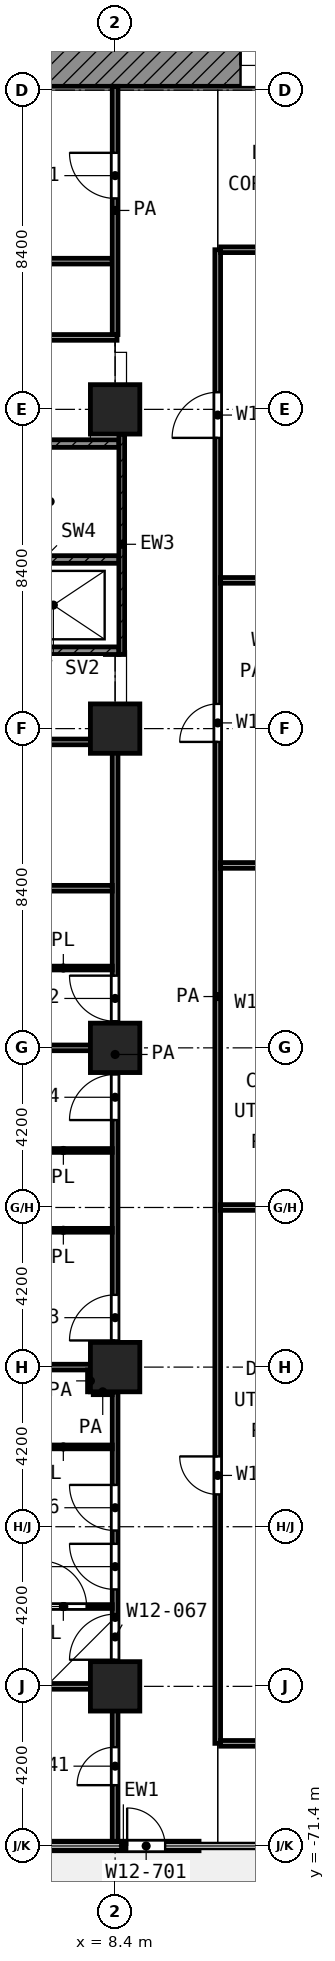
"""IFC4 building model, lengths in metres.
Left out: names, types, materials, properties, quantities, classifications, styles, units other than length and angle.
Written with IfcOpenShell. Run it as: python <this file> out.ifc"""

import sys

from ifc_helpers import new_model, si_unit, direction, frame, frame_2d, origin, origin_2d, place, context, subcontext, project, spatial, rectangle, extrude, element, fill, save


model = new_model("IFC4")
c1 = context("Model", 3, precision=1e-05, world=origin(), true_north=direction((0.0, 1.0)))
c2 = subcontext(c1, "Body", "Model", "MODEL_VIEW")
j1 = project(units=[si_unit("LENGTHUNIT", "METRE"), si_unit("PLANEANGLEUNIT", "RADIAN")], contexts=[c1])
p1 = place(None, origin())
s1 = spatial("IfcSite", under=j1, at=p1, CompositionType="ELEMENT")
p2 = place(p1, origin())
s2 = spatial("IfcBuilding", under=s1, at=p2, CompositionType="ELEMENT")
p3 = place(p2, frame((0.0, 0.0, 56.0)))
s3 = spatial("IfcBuildingStorey", under=s2, at=p3, CompositionType="ELEMENT", Elevation=56.0)
for number, where, z_axis, x_axis in (
    (1, (8.4, -33.6, 0.0), (0.0, 0.0, 1.0), (1.0, 0.0, 0.0)),
    (2, (8.4, -42.0, 0.0), (0.0, 0.0, 1.0), (1.0, 0.0, 0.0)),
    (3, (8.4, -50.4, 0.0), (0.0, 0.0, 1.0), (1.0, 0.0, 0.0)),
    (4, (8.4, -58.8, 0.0), (0.0, 0.0, 1.0), (1.0, 0.0, 0.0)),
    (5, (8.4, -67.2, 0.0), (0.0, 0.0, 1.0), (1.0, 0.0, 0.0)),
):
    element("IfcColumn", number, at=place(p3, frame(where, z_axis=z_axis, x_axis=x_axis)), inside=s3, PredefinedType="COLUMN", context=c2, shape_type="SweptSolid", body=[
        extrude(rectangle(XDim=1.3, YDim=1.3, at=origin_2d()), origin(), (0.0, 0.0, 1.0), 4.2),
    ])
p4 = place(p3, frame((6.625, -71.4, 0.0), z_axis=(0.0, 0.0, 1.0), x_axis=(1.0, 0.0, 0.0)))
e6 = element("IfcWall", 6, at=p4, inside=s3, PredefinedType="SOLIDWALL", context=c2, shape_type="SweptSolid", body=[
    extrude(rectangle(XDim=3.983, YDim=0.25, at=frame_2d((1.992, 0.0))), origin(), (0.0, 0.0, 1.0), 3.78),
])
p5 = place(p4, frame((2.092, 0.0, 0.0)))
e7 = element("IfcOpeningElement", 7, at=p5, cuts=e6, PredefinedType="OPENING", context=c2, shape_type="SweptSolid", body=[
    extrude(rectangle(XDim=1.0, YDim=2.1, at=frame_2d((0.5, 1.05))), frame((0.0, 0.135, 0.0), z_axis=(0.0, -1.0, 0.0), x_axis=(1.0, 0.0, 0.0)), (0.0, 0.0, 1.0), 0.27),
])
p6 = place(p3, frame((5.4, -24.55, 0.0), z_axis=(0.0, 0.0, 1.0), x_axis=(1.0, 0.0, 0.0)))
e8 = element("IfcWall", 8, at=p6, inside=s3, PredefinedType="SHEAR", context=c2, shape_type="SweptSolid", body=[
    extrude(rectangle(XDim=18.6, YDim=1.1, at=frame_2d((9.3, 0.0))), origin(), (0.0, 0.0, 1.0), 3.9),
])
p7 = place(p6, frame((6.3, 0.0, 0.0)))
e9 = element("IfcOpeningElement", 9, at=p7, cuts=e8, PredefinedType="OPENING", context=c2, shape_type="SweptSolid", body=[
    extrude(rectangle(XDim=1.8, YDim=2.1, at=frame_2d((0.9, 1.05))), frame((0.0, 0.56, 0.0), z_axis=(0.0, -1.0, 0.0), x_axis=(1.0, 0.0, 0.0)), (0.0, 0.0, 1.0), 1.12),
])
p8 = place(p3, frame((8.575, -40.05, 0.0), z_axis=(0.0, 0.0, 1.0), x_axis=(0.0, 1.0, 0.0)))
e10 = element("IfcWall", 10, at=p8, inside=s3, PredefinedType="SHEAR", context=c2, shape_type="SweptSolid", body=[
    extrude(rectangle(XDim=5.8, YDim=0.15, at=frame_2d((2.9, 0.0))), origin(), (0.0, 0.0, 1.0), 3.9),
])
p9 = place(p3, frame((0.45, -34.5, 0.0), z_axis=(0.0, 0.0, 1.0), x_axis=(1.0, 0.0, 0.0)))
e11 = element("IfcWall", 11, at=p9, inside=s3, PredefinedType="SHEAR", context=c2, shape_type="SweptSolid", body=[
    extrude(rectangle(XDim=8.05, YDim=0.2, at=frame_2d((4.025, 0.0))), origin(), (0.0, 0.0, 1.0), 3.9),
])
p10 = place(p9, frame((0.75, 0.0, 0.0)))
e12 = element("IfcOpeningElement", 12, at=p10, cuts=e11, PredefinedType="OPENING", context=c2, shape_type="SweptSolid", body=[
    extrude(rectangle(XDim=1.1, YDim=2.1, at=frame_2d((0.55, 1.05))), frame((0.0, 0.11, 0.0), z_axis=(0.0, -1.0, 0.0), x_axis=(1.0, 0.0, 0.0)), (0.0, 0.0, 1.0), 0.22),
])
p11 = place(p3, frame((0.45, -37.55, 0.0), z_axis=(0.0, 0.0, 1.0), x_axis=(1.0, 0.0, 0.0)))
e13 = element("IfcWall", 13, at=p11, inside=s3, PredefinedType="SHEAR", context=c2, shape_type="SweptSolid", body=[
    extrude(rectangle(XDim=8.05, YDim=0.2, at=frame_2d((4.025, 0.0))), origin(), (0.0, 0.0, 1.0), 3.9),
])
p12 = place(p11, frame((0.1, 0.0, 0.0)))
e14 = element("IfcOpeningElement", 14, at=p12, cuts=e13, PredefinedType="OPENING", context=c2, shape_type="SweptSolid", body=[
    extrude(rectangle(XDim=1.1, YDim=2.1, at=frame_2d((0.55, 1.05))), frame((0.0, 0.11, 0.0), z_axis=(0.0, -1.0, 0.0), x_axis=(1.0, 0.0, 0.0)), (0.0, 0.0, 1.0), 0.22),
])
p13 = place(p3, frame((0.45, -39.95, 0.0), z_axis=(0.0, 0.0, 1.0), x_axis=(1.0, 0.0, 0.0)))
e15 = element("IfcWall", 15, at=p13, inside=s3, PredefinedType="SHEAR", context=c2, shape_type="SweptSolid", body=[
    extrude(rectangle(XDim=8.05, YDim=0.2, at=frame_2d((4.025, 0.0))), origin(), (0.0, 0.0, 1.0), 3.9),
])
p14 = place(p13, frame((2.0, 0.0, 0.0)))
e16 = element("IfcOpeningElement", 16, at=p14, cuts=e15, PredefinedType="OPENING", context=c2, shape_type="SweptSolid", body=[
    extrude(rectangle(XDim=1.1, YDim=2.1, at=frame_2d((0.55, 1.05))), frame((0.0, 0.11, 0.0), z_axis=(0.0, -1.0, 0.0), x_axis=(1.0, 0.0, 0.0)), (0.0, 0.0, 1.0), 0.22),
])
p15 = place(p3, frame((5.75, -65.1, 0.0), z_axis=(0.0, 0.0, 1.0), x_axis=(1.0, 0.0, 0.0)))
e17 = element("IfcWall", 17, at=p15, inside=s3, PredefinedType="PARTITIONING", context=c2, shape_type="SweptSolid", body=[
    extrude(rectangle(XDim=2.575, YDim=0.1, at=frame_2d((1.288, 0.0))), origin(), (0.0, 0.0, 1.0), 3.9),
])
p16 = place(p15, frame((0.7, 0.0, 0.0)))
e18 = element("IfcOpeningElement", 18, at=p16, cuts=e17, PredefinedType="OPENING", context=c2, shape_type="SweptSolid", body=[
    extrude(rectangle(XDim=1.2, YDim=2.1, at=frame_2d((0.6, 1.05))), frame((0.0, 0.06, 0.0), z_axis=(0.0, -1.0, 0.0), x_axis=(1.0, 0.0, 0.0)), (0.0, 0.0, 1.0), 0.12),
])
p17 = place(p3, frame((5.75, -60.9, 0.0), z_axis=(0.0, 0.0, 1.0), x_axis=(1.0, 0.0, 0.0)))
e19 = element("IfcWall", 19, at=p17, inside=s3, PredefinedType="PARTITIONING", context=c2, shape_type="SweptSolid", body=[
    extrude(rectangle(XDim=2.575, YDim=0.1, at=frame_2d((1.288, 0.0))), origin(), (0.0, 0.0, 1.0), 3.9),
])
p18 = place(p3, frame((5.751, -55.2, 0.0), z_axis=(0.0, 0.0, 1.0), x_axis=(1.0, 0.0, 0.0)))
e20 = element("IfcWall", 20, at=p18, inside=s3, PredefinedType="PARTITIONING", context=c2, shape_type="SweptSolid", body=[
    extrude(rectangle(XDim=2.574, YDim=0.1, at=frame_2d((1.287, 0.0))), origin(), (0.0, 0.0, 1.0), 3.9),
])
p19 = place(p3, frame((5.752, -53.1, 0.0), z_axis=(0.0, 0.0, 1.0), x_axis=(1.0, 0.0, 0.0)))
e21 = element("IfcWall", 21, at=p19, inside=s3, PredefinedType="PARTITIONING", context=c2, shape_type="SweptSolid", body=[
    extrude(rectangle(XDim=2.573, YDim=0.1, at=frame_2d((1.287, 0.0))), origin(), (0.0, 0.0, 1.0), 3.9),
])
p20 = place(p3, frame((5.75, -48.3, 0.0), z_axis=(0.0, 0.0, 1.0), x_axis=(1.0, 0.0, 0.0)))
e22 = element("IfcWall", 22, at=p20, inside=s3, PredefinedType="PARTITIONING", context=c2, shape_type="SweptSolid", body=[
    extrude(rectangle(XDim=2.575, YDim=0.1, at=frame_2d((1.288, 0.0))), origin(), (0.0, 0.0, 1.0), 3.9),
])
p21 = place(p3, frame((11.175, -68.7, 0.0), z_axis=(0.0, 0.0, 1.0), x_axis=(1.0, 0.0, 0.0)))
e23 = element("IfcWall", 23, at=p21, inside=s3, PredefinedType="PARTITIONING", context=c2, shape_type="SweptSolid", body=[
    extrude(rectangle(XDim=2.85, YDim=0.15, at=frame_2d((1.425, 0.0))), origin(), (0.0, 0.0, 1.0), 3.9),
])
p22 = place(p3, frame((1.913, -67.2, 0.0), z_axis=(0.0, 0.0, 1.0), x_axis=(1.0, 0.0, 0.0)))
e24 = element("IfcWall", 24, at=p22, inside=s3, PredefinedType="PARTITIONING", context=c2, shape_type="SweptSolid", body=[
    extrude(rectangle(XDim=6.412, YDim=0.15, at=frame_2d((3.206, 0.0))), origin(), (0.0, 0.0, 1.0), 3.9),
])
p23 = place(p3, frame((7.825, -59.45, 0.0), z_axis=(0.0, 0.0, 1.0), x_axis=(1.0, 0.0, 0.0)))
e25 = element("IfcWall", 25, at=p23, inside=s3, PredefinedType="PARTITIONING", context=c2, shape_type="SweptSolid", body=[
    extrude(rectangle(XDim=0.498, YDim=0.15, at=frame_2d((0.249, 0.0))), origin(), (0.0, 0.0, 1.0), 3.9),
])
p24 = place(p3, frame((0.08, -58.8, 0.0), z_axis=(0.0, 0.0, 1.0), x_axis=(1.0, 0.0, 0.0)))
e26 = element("IfcWall", 26, at=p24, inside=s3, PredefinedType="PARTITIONING", context=c2, shape_type="SweptSolid", body=[
    extrude(rectangle(XDim=8.243, YDim=0.15, at=frame_2d((4.122, 0.0))), origin(), (0.0, 0.0, 1.0), 3.9),
])
p25 = place(p3, frame((11.175, -54.6, 0.0), z_axis=(0.0, 0.0, 1.0), x_axis=(1.0, 0.0, 0.0)))
e27 = element("IfcWall", 27, at=p25, inside=s3, PredefinedType="PARTITIONING", context=c2, shape_type="SweptSolid", body=[
    extrude(rectangle(XDim=2.85, YDim=0.15, at=frame_2d((1.425, 0.0))), origin(), (0.0, 0.0, 1.0), 3.9),
])
for number, where, z_axis, x_axis in (
    (28, (0.08, -50.4, 0.0), (0.0, 0.0, 1.0), (1.0, 0.0, 0.0)),
    (29, (0.08, -46.2, 0.0), (0.0, 0.0, 1.0), (1.0, 0.0, 0.0)),
):
    element("IfcWall", number, at=place(p3, frame(where, z_axis=z_axis, x_axis=x_axis)), inside=s3, PredefinedType="PARTITIONING", context=c2, shape_type="SweptSolid", body=[
        extrude(rectangle(XDim=8.245, YDim=0.15, at=frame_2d((4.123, 0.0))), origin(), (0.0, 0.0, 1.0), 3.9),
    ])
p26 = place(p3, frame((11.175, -45.6, 0.0), z_axis=(0.0, 0.0, 1.0), x_axis=(1.0, 0.0, 0.0)))
e30 = element("IfcWall", 30, at=p26, inside=s3, PredefinedType="PARTITIONING", context=c2, shape_type="SweptSolid", body=[
    extrude(rectangle(XDim=2.85, YDim=0.15, at=frame_2d((1.425, 0.0))), origin(), (0.0, 0.0, 1.0), 3.9),
])
p27 = place(p3, frame((2.327, -42.35, 0.0), z_axis=(0.0, 0.0, 1.0), x_axis=(1.0, 0.0, 0.0)))
e31 = element("IfcWall", 31, at=p27, inside=s3, PredefinedType="PARTITIONING", context=c2, shape_type="SweptSolid", body=[
    extrude(rectangle(XDim=5.998, YDim=0.15, at=frame_2d((2.999, 0.0))), origin(), (0.0, 0.0, 1.0), 3.9),
])
p28 = place(p27, frame((2.499, 0.0, 0.0)))
e32 = element("IfcOpeningElement", 32, at=p28, cuts=e31, PredefinedType="OPENING", context=c2, shape_type="SweptSolid", body=[
    extrude(rectangle(XDim=1.0, YDim=2.1, at=frame_2d((0.5, 1.05))), frame((0.0, 0.085, 0.0), z_axis=(0.0, -1.0, 0.0), x_axis=(1.0, 0.0, 0.0)), (0.0, 0.0, 1.0), 0.17),
])
p29 = place(p3, frame((11.175, -38.1, 0.0), z_axis=(0.0, 0.0, 1.0), x_axis=(1.0, 0.0, 0.0)))
e33 = element("IfcWall", 33, at=p29, inside=s3, PredefinedType="PARTITIONING", context=c2, shape_type="SweptSolid", body=[
    extrude(rectangle(XDim=2.85, YDim=0.15, at=frame_2d((1.425, 0.0))), origin(), (0.0, 0.0, 1.0), 3.9),
])
p30 = place(p3, frame((1.002, -31.707, 0.0), z_axis=(0.0, 0.0, 1.0), x_axis=(1.0, 0.0, 0.0)))
e34 = element("IfcWall", 34, at=p30, inside=s3, PredefinedType="PARTITIONING", context=c2, shape_type="SweptSolid", body=[
    extrude(rectangle(XDim=7.448, YDim=0.15, at=frame_2d((3.724, 0.0))), origin(), (0.0, 0.0, 1.0), 3.9),
])
p31 = place(p30, frame((3.199, 0.0, 0.0)))
e35 = element("IfcOpeningElement", 35, at=p31, cuts=e34, PredefinedType="OPENING", context=c2, shape_type="SweptSolid", body=[
    extrude(rectangle(XDim=1.0, YDim=2.1, at=frame_2d((0.5, 1.05))), frame((0.0, 0.085, 0.0), z_axis=(0.0, -1.0, 0.0), x_axis=(1.0, 0.0, 0.0)), (0.0, 0.0, 1.0), 0.17),
])
p32 = place(p3, frame((0.08, -29.7, 0.0), z_axis=(0.0, 0.0, 1.0), x_axis=(1.0, 0.0, 0.0)))
e36 = element("IfcWall", 36, at=p32, inside=s3, PredefinedType="PARTITIONING", context=c2, shape_type="SweptSolid", body=[
    extrude(rectangle(XDim=8.245, YDim=0.15, at=frame_2d((4.123, 0.0))), origin(), (0.0, 0.0, 1.0), 3.9),
])
p33 = place(p3, frame((11.175, -29.4, 0.0), z_axis=(0.0, 0.0, 1.0), x_axis=(1.0, 0.0, 0.0)))
e37 = element("IfcWall", 37, at=p33, inside=s3, PredefinedType="PARTITIONING", context=c2, shape_type="SweptSolid", body=[
    extrude(rectangle(XDim=2.85, YDim=0.15, at=frame_2d((1.425, 0.0))), origin(), (0.0, 0.0, 1.0), 3.9),
])
p34 = place(p3, frame((7.75, -59.45, 0.0), z_axis=(0.0, 0.0, 1.0), x_axis=(0.0, 1.0, 0.0)))
e38 = element("IfcWall", 38, at=p34, inside=s3, PredefinedType="PARTITIONING", context=c2, shape_type="SweptSolid", body=[
    extrude(rectangle(XDim=0.575, YDim=0.15, at=frame_2d((0.288, 0.0))), origin(), (0.0, 0.0, 1.0), 3.9),
])
p35 = place(p3, frame((8.4, -71.32, 0.0), z_axis=(0.0, 0.0, 1.0), x_axis=(0.0, 1.0, 0.0)))
e39 = element("IfcWall", 39, at=p35, inside=s3, PredefinedType="PARTITIONING", context=c2, shape_type="SweptSolid", body=[
    extrude(rectangle(XDim=11.868, YDim=0.15, at=frame_2d((5.934, 0.0))), origin(), (0.0, 0.0, 1.0), 3.9),
])
p36 = place(p35, frame((6.67, 0.0, 0.0)))
e40 = element("IfcOpeningElement", 40, at=p36, cuts=e39, PredefinedType="OPENING", context=c2, shape_type="SweptSolid", body=[
    extrude(rectangle(XDim=1.2, YDim=2.1, at=frame_2d((0.6, 1.05))), frame((0.0, 0.085, 0.0), z_axis=(0.0, -1.0, 0.0), x_axis=(1.0, 0.0, 0.0)), (0.0, 0.0, 1.0), 0.17),
])
p37 = place(p35, frame((8.22, 0.0, 0.0)))
e41 = element("IfcOpeningElement", 41, at=p37, cuts=e39, PredefinedType="OPENING", context=c2, shape_type="SweptSolid", body=[
    extrude(rectangle(XDim=1.2, YDim=2.1, at=frame_2d((0.6, 1.05))), frame((0.0, 0.085, 0.0), z_axis=(0.0, -1.0, 0.0), x_axis=(1.0, 0.0, 0.0)), (0.0, 0.0, 1.0), 0.17),
])
p38 = place(p35, frame((4.82, 0.0, 0.0)))
e42 = element("IfcOpeningElement", 42, at=p38, cuts=e39, PredefinedType="OPENING", context=c2, shape_type="SweptSolid", body=[
    extrude(rectangle(XDim=1.2, YDim=2.1, at=frame_2d((0.6, 1.05))), frame((0.0, 0.085, 0.0), z_axis=(0.0, -1.0, 0.0), x_axis=(1.0, 0.0, 0.0)), (0.0, 0.0, 1.0), 0.17),
])
p39 = place(p35, frame((1.52, 0.0, 0.0)))
e43 = element("IfcOpeningElement", 43, at=p39, cuts=e39, PredefinedType="OPENING", context=c2, shape_type="SweptSolid", body=[
    extrude(rectangle(XDim=1.0, YDim=2.1, at=frame_2d((0.5, 1.05))), frame((0.0, 0.085, 0.0), z_axis=(0.0, -1.0, 0.0), x_axis=(1.0, 0.0, 0.0)), (0.0, 0.0, 1.0), 0.17),
])
p40 = place(p3, frame((8.4, -58.798, 0.0), z_axis=(0.0, 0.0, 1.0), x_axis=(0.0, 1.0, 0.0)))
e44 = element("IfcWall", 44, at=p40, inside=s3, PredefinedType="PARTITIONING", context=c2, shape_type="SweptSolid", body=[
    extrude(rectangle(XDim=16.448, YDim=0.15, at=frame_2d((8.224, 0.0))), origin(), (0.0, 0.0, 1.0), 3.9),
])
p41 = place(p40, frame((9.098, 0.0, 0.0)))
e45 = element("IfcOpeningElement", 45, at=p41, cuts=e44, PredefinedType="OPENING", context=c2, shape_type="SweptSolid", body=[
    extrude(rectangle(XDim=1.2, YDim=2.1, at=frame_2d((0.6, 1.05))), frame((0.0, 0.085, 0.0), z_axis=(0.0, -1.0, 0.0), x_axis=(1.0, 0.0, 0.0)), (0.0, 0.0, 1.0), 0.17),
])
p42 = place(p40, frame((0.699, 0.0, 0.0)))
e46 = element("IfcOpeningElement", 46, at=p42, cuts=e44, PredefinedType="OPENING", context=c2, shape_type="SweptSolid", body=[
    extrude(rectangle(XDim=1.2, YDim=2.1, at=frame_2d((0.6, 1.05))), frame((0.0, 0.085, 0.0), z_axis=(0.0, -1.0, 0.0), x_axis=(1.0, 0.0, 0.0)), (0.0, 0.0, 1.0), 0.17),
])
p43 = place(p40, frame((6.498, 0.0, 0.0)))
e47 = element("IfcOpeningElement", 47, at=p43, cuts=e44, PredefinedType="OPENING", context=c2, shape_type="SweptSolid", body=[
    extrude(rectangle(XDim=1.2, YDim=2.1, at=frame_2d((0.6, 1.05))), frame((0.0, 0.085, 0.0), z_axis=(0.0, -1.0, 0.0), x_axis=(1.0, 0.0, 0.0)), (0.0, 0.0, 1.0), 0.17),
])
p44 = place(p3, frame((8.4, -31.632, 0.0), z_axis=(0.0, 0.0, 1.0), x_axis=(0.0, 1.0, 0.0)))
e48 = element("IfcWall", 48, at=p44, inside=s3, PredefinedType="PARTITIONING", context=c2, shape_type="SweptSolid", body=[
    extrude(rectangle(XDim=6.532, YDim=0.15, at=frame_2d((3.266, 0.0))), origin(), (0.0, 0.0, 1.0), 3.9),
])
p45 = place(p44, frame((3.582, 0.0, 0.0)))
e49 = element("IfcOpeningElement", 49, at=p45, cuts=e48, PredefinedType="OPENING", context=c2, shape_type="SweptSolid", body=[
    extrude(rectangle(XDim=1.2, YDim=2.1, at=frame_2d((0.6, 1.05))), frame((0.0, 0.085, 0.0), z_axis=(0.0, -1.0, 0.0), x_axis=(1.0, 0.0, 0.0)), (0.0, 0.0, 1.0), 0.17),
])
p46 = place(p3, frame((11.1, -68.7, 0.0), z_axis=(0.0, 0.0, 1.0), x_axis=(0.0, 1.0, 0.0)))
e50 = element("IfcWall", 50, at=p46, inside=s3, PredefinedType="PARTITIONING", context=c2, shape_type="SweptSolid", body=[
    extrude(rectangle(XDim=39.3, YDim=0.15, at=frame_2d((19.65, 0.0))), origin(), (0.0, 0.0, 1.0), 3.9),
])
p47 = place(p46, frame((34.35, 0.0, 0.0)))
e51 = element("IfcOpeningElement", 51, at=p47, cuts=e50, PredefinedType="OPENING", context=c2, shape_type="SweptSolid", body=[
    extrude(rectangle(XDim=1.2, YDim=2.1, at=frame_2d((0.6, 1.05))), frame((0.0, 0.085, 0.0), z_axis=(0.0, -1.0, 0.0), x_axis=(1.0, 0.0, 0.0)), (0.0, 0.0, 1.0), 0.17),
])
p48 = place(p46, frame((26.35, 0.0, 0.0)))
e52 = element("IfcOpeningElement", 52, at=p48, cuts=e50, PredefinedType="OPENING", context=c2, shape_type="SweptSolid", body=[
    extrude(rectangle(XDim=1.0, YDim=2.1, at=frame_2d((0.5, 1.05))), frame((0.0, 0.085, 0.0), z_axis=(0.0, -1.0, 0.0), x_axis=(1.0, 0.0, 0.0)), (0.0, 0.0, 1.0), 0.17),
])
p49 = place(p46, frame((6.55, 0.0, 0.0)))
e53 = element("IfcOpeningElement", 53, at=p49, cuts=e50, PredefinedType="OPENING", context=c2, shape_type="SweptSolid", body=[
    extrude(rectangle(XDim=1.0, YDim=2.1, at=frame_2d((0.5, 1.05))), frame((0.0, 0.085, 0.0), z_axis=(0.0, -1.0, 0.0), x_axis=(1.0, 0.0, 0.0)), (0.0, 0.0, 1.0), 0.17),
])
p50 = place(p5, origin())
e54 = element("IfcDoor", 54, at=p50, inside=s3, OperationType="SINGLE_SWING_LEFT", PredefinedType="DOOR", context=c2, shape_type="SweptSolid", body=[
    extrude(rectangle(XDim=1.0, YDim=2.1, at=frame_2d((0.5, 1.05))), frame((0.0, 0.025, 0.0), z_axis=(0.0, -1.0, 0.0), x_axis=(1.0, 0.0, 0.0)), (0.0, 0.0, 1.0), 0.05),
])
fill(e7, e54)
p51 = place(p7, origin())
e55 = element("IfcDoor", 55, at=p51, inside=s3, OperationType="DOUBLE_DOOR_SINGLE_SWING", PredefinedType="DOOR", context=c2, shape_type="SweptSolid", body=[
    extrude(rectangle(XDim=1.8, YDim=2.1, at=frame_2d((0.9, 1.05))), frame((0.0, 0.025, 0.0), z_axis=(0.0, -1.0, 0.0), x_axis=(1.0, 0.0, 0.0)), (0.0, 0.0, 1.0), 0.05),
])
fill(e9, e55)
p52 = place(p45, origin())
e56 = element("IfcDoor", 56, at=p52, inside=s3, OperationType="SINGLE_SWING_RIGHT", PredefinedType="DOOR", context=c2, shape_type="SweptSolid", body=[
    extrude(rectangle(XDim=1.2, YDim=2.1, at=frame_2d((0.6, 1.05))), frame((0.0, 0.025, 0.0), z_axis=(0.0, -1.0, 0.0), x_axis=(1.0, 0.0, 0.0)), (0.0, 0.0, 1.0), 0.05),
])
fill(e49, e56)
p53 = place(p41, origin())
e57 = element("IfcDoor", 57, at=p53, inside=s3, OperationType="SINGLE_SWING_RIGHT", PredefinedType="DOOR", context=c2, shape_type="SweptSolid", body=[
    extrude(rectangle(XDim=1.2, YDim=2.1, at=frame_2d((0.6, 1.05))), frame((0.0, 0.025, 0.0), z_axis=(0.0, -1.0, 0.0), x_axis=(1.0, 0.0, 0.0)), (0.0, 0.0, 1.0), 0.05),
])
fill(e45, e57)
p54 = place(p42, origin())
e58 = element("IfcDoor", 58, at=p54, inside=s3, OperationType="SINGLE_SWING_LEFT", PredefinedType="DOOR", context=c2, shape_type="SweptSolid", body=[
    extrude(rectangle(XDim=1.2, YDim=2.1, at=frame_2d((0.6, 1.05))), frame((0.0, 0.025, 0.0), z_axis=(0.0, -1.0, 0.0), x_axis=(1.0, 0.0, 0.0)), (0.0, 0.0, 1.0), 0.05),
])
fill(e46, e58)
p55 = place(p43, origin())
e59 = element("IfcDoor", 59, at=p55, inside=s3, OperationType="SINGLE_SWING_LEFT", PredefinedType="DOOR", context=c2, shape_type="SweptSolid", body=[
    extrude(rectangle(XDim=1.2, YDim=2.1, at=frame_2d((0.6, 1.05))), frame((0.0, 0.025, 0.0), z_axis=(0.0, -1.0, 0.0), x_axis=(1.0, 0.0, 0.0)), (0.0, 0.0, 1.0), 0.05),
])
fill(e47, e59)
p56 = place(p36, origin())
e60 = element("IfcDoor", 60, at=p56, inside=s3, OperationType="SINGLE_SWING_RIGHT", PredefinedType="DOOR", context=c2, shape_type="SweptSolid", body=[
    extrude(rectangle(XDim=1.2, YDim=2.1, at=frame_2d((0.6, 1.05))), frame((0.0, 0.025, 0.0), z_axis=(0.0, -1.0, 0.0), x_axis=(1.0, 0.0, 0.0)), (0.0, 0.0, 1.0), 0.05),
])
fill(e40, e60)
p57 = place(p37, origin())
e61 = element("IfcDoor", 61, at=p57, inside=s3, OperationType="SINGLE_SWING_RIGHT", PredefinedType="DOOR", context=c2, shape_type="SweptSolid", body=[
    extrude(rectangle(XDim=1.2, YDim=2.1, at=frame_2d((0.6, 1.05))), frame((0.0, 0.025, 0.0), z_axis=(0.0, -1.0, 0.0), x_axis=(1.0, 0.0, 0.0)), (0.0, 0.0, 1.0), 0.05),
])
fill(e41, e61)
p58 = place(p38, origin())
e62 = element("IfcDoor", 62, at=p58, inside=s3, OperationType="SINGLE_SWING_LEFT", PredefinedType="DOOR", context=c2, shape_type="SweptSolid", body=[
    extrude(rectangle(XDim=1.2, YDim=2.1, at=frame_2d((0.6, 1.05))), frame((0.0, 0.025, 0.0), z_axis=(0.0, -1.0, 0.0), x_axis=(1.0, 0.0, 0.0)), (0.0, 0.0, 1.0), 0.05),
])
fill(e42, e62)
p59 = place(p16, origin())
e63 = element("IfcDoor", 63, at=p59, inside=s3, OperationType="SINGLE_SWING_LEFT", PredefinedType="DOOR", context=c2, shape_type="SweptSolid", body=[
    extrude(rectangle(XDim=1.2, YDim=2.1, at=frame_2d((0.6, 1.05))), frame((0.0, 0.025, 0.0), z_axis=(0.0, -1.0, 0.0), x_axis=(1.0, 0.0, 0.0)), (0.0, 0.0, 1.0), 0.05),
])
fill(e18, e63)
p60 = place(p39, origin())
e64 = element("IfcDoor", 64, at=p60, inside=s3, OperationType="SINGLE_SWING_LEFT", PredefinedType="DOOR", context=c2, shape_type="SweptSolid", body=[
    extrude(rectangle(XDim=1.0, YDim=2.1, at=frame_2d((0.5, 1.05))), frame((0.0, 0.025, 0.0), z_axis=(0.0, -1.0, 0.0), x_axis=(1.0, 0.0, 0.0)), (0.0, 0.0, 1.0), 0.05),
])
fill(e43, e64)
p61 = place(p47, origin())
e65 = element("IfcDoor", 65, at=p61, inside=s3, OperationType="SINGLE_SWING_LEFT", PredefinedType="DOOR", context=c2, shape_type="SweptSolid", body=[
    extrude(rectangle(XDim=1.2, YDim=2.1, at=frame_2d((0.6, 1.05))), frame((0.0, 0.025, 0.0), z_axis=(0.0, -1.0, 0.0), x_axis=(1.0, 0.0, 0.0)), (0.0, 0.0, 1.0), 0.05),
])
fill(e51, e65)
p62 = place(p48, origin())
e66 = element("IfcDoor", 66, at=p62, inside=s3, OperationType="SINGLE_SWING_LEFT", PredefinedType="DOOR", context=c2, shape_type="SweptSolid", body=[
    extrude(rectangle(XDim=1.0, YDim=2.1, at=frame_2d((0.5, 1.05))), frame((0.0, 0.025, 0.0), z_axis=(0.0, -1.0, 0.0), x_axis=(1.0, 0.0, 0.0)), (0.0, 0.0, 1.0), 0.05),
])
fill(e52, e66)
p63 = place(p49, origin())
e67 = element("IfcDoor", 67, at=p63, inside=s3, OperationType="SINGLE_SWING_RIGHT", PredefinedType="DOOR", context=c2, shape_type="SweptSolid", body=[
    extrude(rectangle(XDim=1.0, YDim=2.1, at=frame_2d((0.5, 1.05))), frame((0.0, 0.025, 0.0), z_axis=(0.0, -1.0, 0.0), x_axis=(1.0, 0.0, 0.0)), (0.0, 0.0, 1.0), 0.05),
])
fill(e53, e67)
save(model, sys.argv[1])
